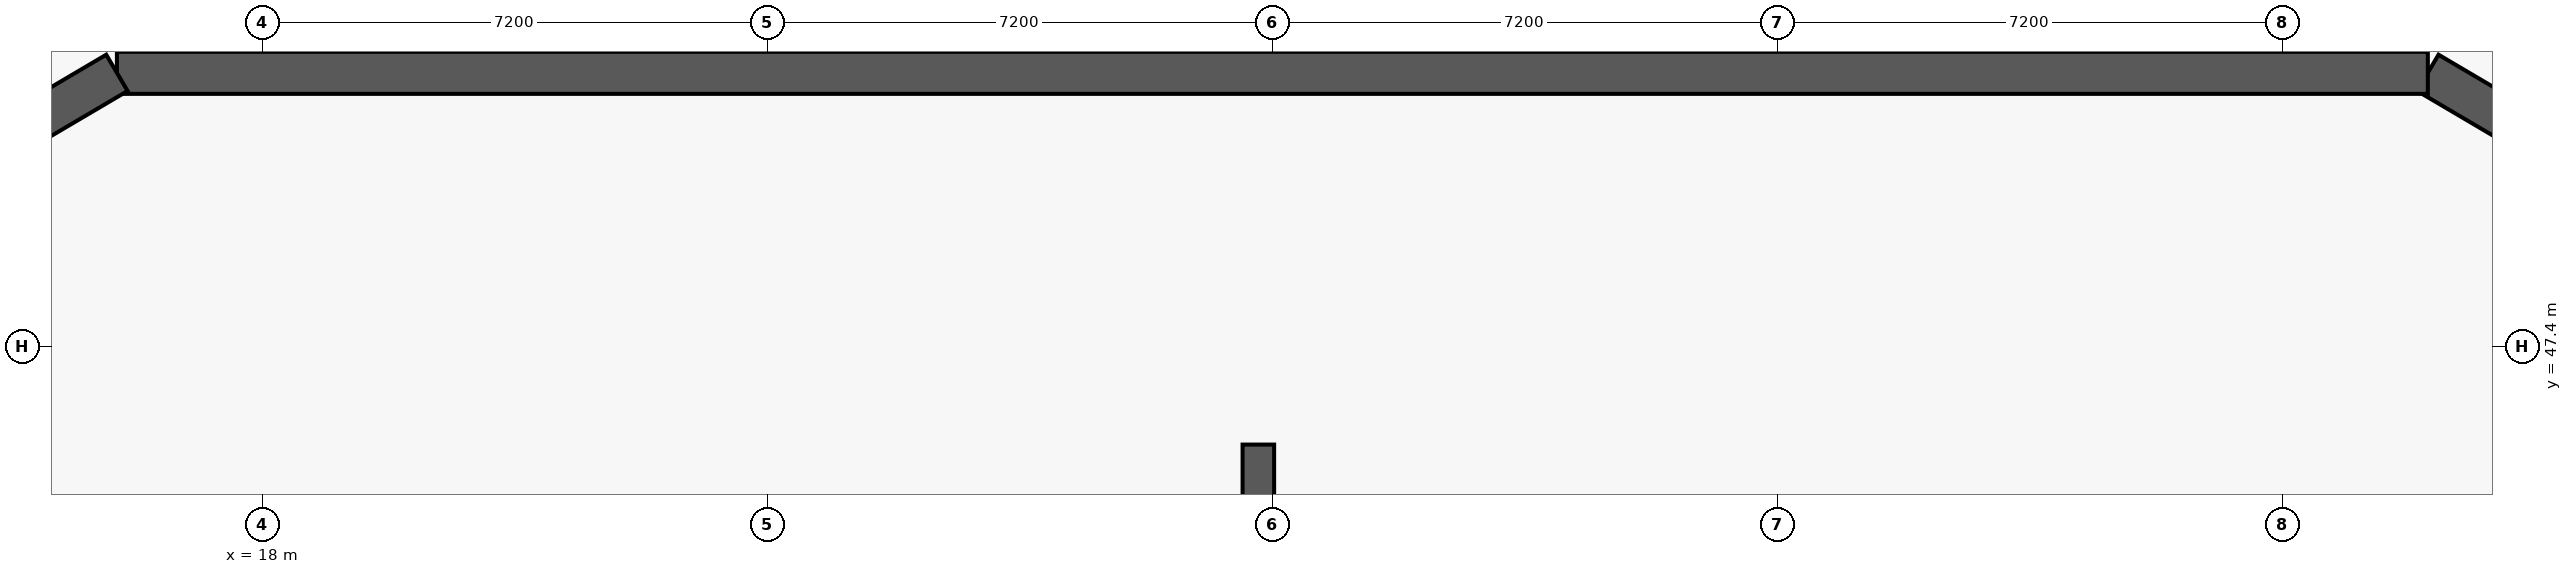
"""IFC4 building model, lengths in metres.
Left out: names, types, materials, properties, quantities, classifications, styles, units other than length and angle.
Written with IfcOpenShell. Run it as: python <this file> out.ifc"""

import sys

from ifc_helpers import new_model, si_unit, direction, frame, frame_2d, origin, origin_2d, place, context, subcontext, project, spatial, rectangle, extrude, element, save


model = new_model("IFC4")
c1 = context("Model", 3, precision=1e-05, world=origin(), true_north=direction((0.0, 1.0)))
c2 = subcontext(c1, "Body", "Model", "MODEL_VIEW")
j1 = project(units=[si_unit("LENGTHUNIT", "METRE"), si_unit("PLANEANGLEUNIT", "RADIAN")], contexts=[c1])
p1 = place(None, origin())
s1 = spatial("IfcSite", under=j1, at=p1, CompositionType="ELEMENT")
p2 = place(p1, origin())
s2 = spatial("IfcBuilding", under=s1, at=p2, CompositionType="ELEMENT")
p3 = place(p2, frame((0.0, 0.0, -4.8)))
s3 = spatial("IfcBuildingStorey", under=s2, at=p3, CompositionType="ELEMENT", Elevation=-4.8)
p4 = place(p3, frame((51.103, 49.988, 0.0), z_axis=(0.0, 0.0, 1.0), x_axis=(-0.861598949961, 0.507589646689, 0.0)))
e1 = element("IfcWall", 1, at=p4, inside=s3, PredefinedType="USERDEFINED", context=c2, shape_type="SweptSolid", body=[
    extrude(rectangle(XDim=2.585, YDim=0.6, at=frame_2d((1.292, 0.0))), origin(), (0.0, 0.0, 1.0), 4.55),
])
p5 = place(p3, frame((48.876, 51.3, 0.0), z_axis=(0.0, 0.0, 1.0), x_axis=(-1.0, 0.0, 0.0)))
e2 = element("IfcWall", 2, at=p5, inside=s3, PredefinedType="USERDEFINED", context=c2, shape_type="SweptSolid", body=[
    extrude(rectangle(XDim=32.952, YDim=0.6, at=frame_2d((16.476, 0.0))), origin(), (0.0, 0.0, 1.0), 4.55),
])
p6 = place(p3, frame((15.924, 51.3, 0.0), z_axis=(0.0, 0.0, 1.0), x_axis=(-0.861598949961, -0.507589646689, 0.0)))
e3 = element("IfcWall", 3, at=p6, inside=s3, PredefinedType="USERDEFINED", context=c2, shape_type="SweptSolid", body=[
    extrude(rectangle(XDim=2.585, YDim=0.6, at=frame_2d((1.292, 0.0))), origin(), (0.0, 0.0, 1.0), 4.55),
])
for number, where, z_axis, x_axis in (
    (4, (41.245, 50.283, 0.0), (0.0, 0.0, 1.0), (1.0, 0.0, 0.0)),
    (5, (23.555, 50.283, 0.0), (0.0, 0.0, 1.0), (1.0, 0.0, 0.0)),
):
    element("IfcColumn", number, at=place(p3, frame(where, z_axis=z_axis, x_axis=x_axis)), inside=s3, PredefinedType="COLUMN", context=c2, shape_type="SweptSolid", body=[
        extrude(rectangle(XDim=1.8, YDim=1.8, at=origin_2d()), origin(), (0.0, 0.0, 1.0), 4.8),
    ])
p7 = place(p3, frame((32.2, 39.5, 0.0), z_axis=(0.0, 0.0, 1.0), x_axis=(0.0, 1.0, 0.0)))
e6 = element("IfcWall", 6, at=p7, inside=s3, PredefinedType="SHEAR", context=c2, shape_type="SweptSolid", body=[
    extrude(rectangle(XDim=6.5, YDim=0.45, at=frame_2d((3.25, 0.0))), origin(), (0.0, 0.0, 1.0), 2.08),
])
save(model, sys.argv[1])
